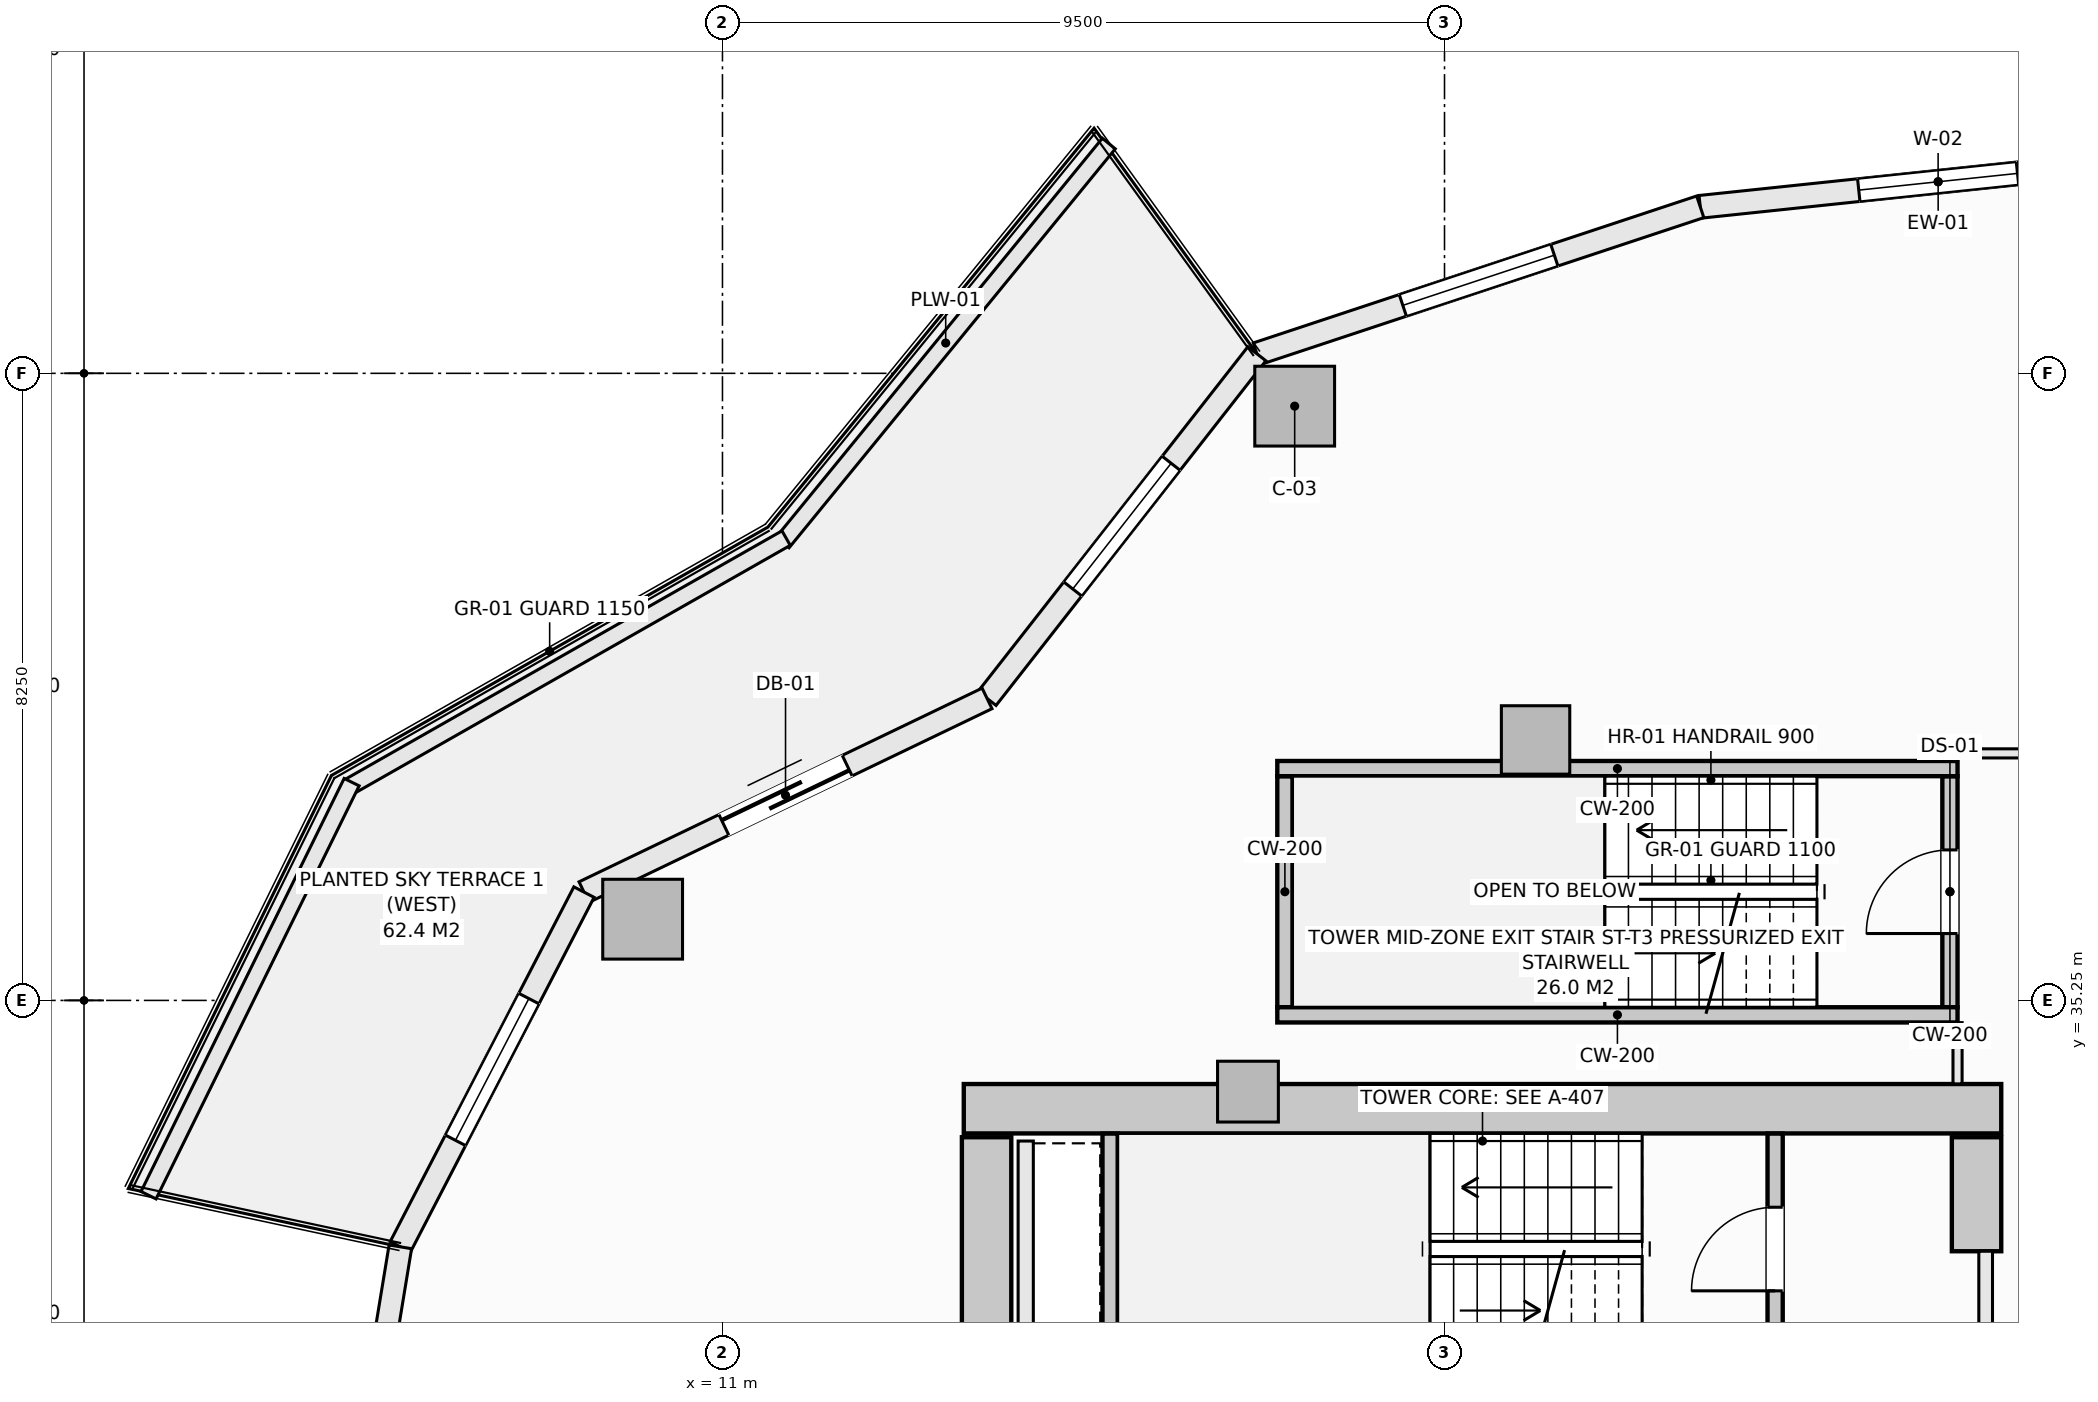
"""IFC4 building model, lengths in metres.
Left out: names, types, materials, properties, quantities, classifications, styles, units other than length and angle.
Written with IfcOpenShell. Run it as: python <this file> out.ifc"""

import sys

from ifc_helpers import new_model, si_unit, direction, frame, frame_2d, origin, origin_2d, place, context, subcontext, project, spatial, rectangle, extrude, element, fill, save


model = new_model("IFC4")
c1 = context("Model", 3, precision=1e-05, world=origin(), true_north=direction((0.0, 1.0)))
c2 = subcontext(c1, "Body", "Model", "MODEL_VIEW")
j1 = project(units=[si_unit("LENGTHUNIT", "METRE"), si_unit("PLANEANGLEUNIT", "RADIAN")], contexts=[c1])
p1 = place(None, origin())
s1 = spatial("IfcSite", under=j1, at=p1, CompositionType="ELEMENT")
p2 = place(p1, origin())
s2 = spatial("IfcBuilding", under=s1, at=p2, CompositionType="ELEMENT")
p3 = place(p2, frame((0.0, 0.0, 132.5)))
s3 = spatial("IfcBuildingStorey", under=s2, at=p3, CompositionType="ELEMENT", Elevation=132.5)
p4 = place(p3, frame((14.175, 33.825, -0.27), z_axis=(0.0, 0.0, 1.0), x_axis=(1.0, 0.0, 0.0)))
e1 = element("IfcWall", 1, at=p4, inside=s3, PredefinedType="SHEAR", context=c2, shape_type="SweptSolid", body=[
    extrude(rectangle(XDim=13.65, YDim=0.65, at=frame_2d((6.825, 0.0))), origin(), (0.0, 0.0, 1.0), 3.4),
])
p5 = place(p3, frame((14.475, 20.55, -0.27), z_axis=(0.0, 0.0, 1.0), x_axis=(0.0, 1.0, 0.0)))
e2 = element("IfcWall", 2, at=p5, inside=s3, PredefinedType="SHEAR", context=c2, shape_type="SweptSolid", body=[
    extrude(rectangle(XDim=12.9, YDim=0.65, at=frame_2d((6.45, 0.0))), origin(), (0.0, 0.0, 1.0), 3.4),
])
p6 = place(p3, frame((27.5, 31.95, -0.27), z_axis=(0.0, 0.0, 1.0), x_axis=(0.0, 1.0, 0.0)))
e3 = element("IfcWall", 3, at=p6, inside=s3, PredefinedType="SHEAR", context=c2, shape_type="SweptSolid", body=[
    extrude(rectangle(XDim=1.5, YDim=0.65, at=frame_2d((0.75, 0.0))), origin(), (0.0, 0.0, 1.0), 3.4),
])
for number, where, z_axis, x_axis in (
    (4, (18.529, 43.068, -0.27), (0.0, 0.0, 1.0), (1.0, 0.0, 0.0)),
    (5, (9.95, 36.319, -0.27), (0.0, 0.0, 1.0), (1.0, 0.0, 0.0)),
):
    element("IfcColumn", number, at=place(p3, frame(where, z_axis=z_axis, x_axis=x_axis)), inside=s3, PredefinedType="COLUMN", context=c2, shape_type="SweptSolid", body=[
        extrude(rectangle(XDim=1.05, YDim=1.05, at=origin_2d()), origin(), (0.0, 0.0, 1.0), 3.4),
    ])
p7 = place(p3, frame((21.698, 38.677, -0.27), z_axis=(0.0, 0.0, 1.0), x_axis=(1.0, 0.0, 0.0)))
e6 = element("IfcColumn", 6, at=p7, inside=s3, PredefinedType="COLUMN", context=c2, shape_type="SweptSolid", body=[
    extrude(rectangle(XDim=0.9, YDim=0.9, at=origin_2d()), origin(), (0.0, 0.0, 1.0), 3.4),
])
p8 = place(p3, frame((17.914, 34.05, -0.27), z_axis=(0.0, 0.0, 1.0), x_axis=(1.0, 0.0, 0.0)))
e7 = element("IfcColumn", 7, at=p8, inside=s3, PredefinedType="PILASTER", context=c2, shape_type="SweptSolid", body=[
    extrude(rectangle(XDim=0.8, YDim=0.8, at=origin_2d()), origin(), (0.0, 0.0, 1.0), 3.4),
])
p9 = place(p3, frame((23.865, 45.691, 0.0), z_axis=(0.0, 0.0, 1.0), x_axis=(0.994498012394, 0.104755445421, 0.0)))
e8 = element("IfcWall", 8, at=p9, inside=s3, PredefinedType="SOLIDWALL", context=c2, shape_type="SweptSolid", body=[
    extrude(rectangle(XDim=6.295, YDim=0.3, at=frame_2d((3.147, 0.0))), origin(), (0.0, 0.0, 1.0), 2.653),
])
p10 = place(p9, frame((2.097, 0.0, 0.74)))
e9 = element("IfcOpeningElement", 9, at=p10, cuts=e8, PredefinedType="OPENING", context=c2, shape_type="SweptSolid", body=[
    extrude(rectangle(XDim=2.1, YDim=1.7, at=frame_2d((1.05, 0.85))), frame((0.0, 0.16, 0.0), z_axis=(0.0, -1.0, 0.0), x_axis=(1.0, 0.0, 0.0)), (0.0, 0.0, 1.0), 0.32),
])
p11 = place(p3, frame((18.031, 43.758, 0.0), z_axis=(0.0, 0.0, 1.0), x_axis=(0.949238009374, 0.314558741032, 0.0)))
e10 = element("IfcWall", 10, at=p11, inside=s3, PredefinedType="SOLIDWALL", context=c2, shape_type="SweptSolid", body=[
    extrude(rectangle(XDim=6.146, YDim=0.3, at=frame_2d((3.073, 0.0))), origin(), (0.0, 0.0, 1.0), 2.653),
])
p12 = place(p11, frame((2.023, 0.0, 0.74)))
e11 = element("IfcOpeningElement", 11, at=p12, cuts=e10, PredefinedType="OPENING", context=c2, shape_type="SweptSolid", body=[
    extrude(rectangle(XDim=2.1, YDim=1.7, at=frame_2d((1.05, 0.85))), frame((0.0, 0.16, 0.0), z_axis=(0.0, -1.0, 0.0), x_axis=(1.0, 0.0, 0.0)), (0.0, 0.0, 1.0), 0.32),
])
p13 = place(p3, frame((14.481, 39.223, 0.0), z_axis=(0.0, 0.0, 1.0), x_axis=(0.616435134162, 0.787405693001, 0.0)))
e12 = element("IfcWall", 12, at=p13, inside=s3, PredefinedType="SOLIDWALL", context=c2, shape_type="SweptSolid", body=[
    extrude(rectangle(XDim=5.759, YDim=0.3, at=frame_2d((2.879, 0.0))), origin(), (0.0, 0.0, 1.0), 2.653),
])
p14 = place(p13, frame((1.829, 0.0, 0.74)))
e13 = element("IfcOpeningElement", 13, at=p14, cuts=e12, PredefinedType="OPENING", context=c2, shape_type="SweptSolid", body=[
    extrude(rectangle(XDim=2.1, YDim=1.7, at=frame_2d((1.05, 0.85))), frame((0.0, 0.16, 0.0), z_axis=(0.0, -1.0, 0.0), x_axis=(1.0, 0.0, 0.0)), (0.0, 0.0, 1.0), 0.32),
])
p15 = place(p3, frame((9.178, 36.675, 0.0), z_axis=(0.0, 0.0, 1.0), x_axis=(0.901370184739, 0.433049408339, 0.0)))
e14 = element("IfcWall", 14, at=p15, inside=s3, PredefinedType="SOLIDWALL", context=c2, shape_type="SweptSolid", body=[
    extrude(rectangle(XDim=5.884, YDim=0.3, at=frame_2d((2.942, 0.0))), origin(), (0.0, 0.0, 1.0), 2.653),
])
p16 = place(p15, frame((2.042, 0.0, 0.0)))
e15 = element("IfcOpeningElement", 15, at=p16, cuts=e14, PredefinedType="OPENING", context=c2, shape_type="SweptSolid", body=[
    extrude(rectangle(XDim=1.8, YDim=2.25, at=frame_2d((0.9, 1.125))), frame((0.0, 0.16, 0.0), z_axis=(0.0, -1.0, 0.0), x_axis=(1.0, 0.0, 0.0)), (0.0, 0.0, 1.0), 0.32),
])
p17 = place(p3, frame((6.762, 32.008, 0.0), z_axis=(0.0, 0.0, 1.0), x_axis=(0.459767899643, 0.888039119892, 0.0)))
e16 = element("IfcWall", 16, at=p17, inside=s3, PredefinedType="SOLIDWALL", context=c2, shape_type="SweptSolid", body=[
    extrude(rectangle(XDim=5.255, YDim=0.3, at=frame_2d((2.628, 0.0))), origin(), (0.0, 0.0, 1.0), 2.653),
])
p18 = place(p17, frame((1.578, 0.0, 0.74)))
e17 = element("IfcOpeningElement", 17, at=p18, cuts=e16, PredefinedType="OPENING", context=c2, shape_type="SweptSolid", body=[
    extrude(rectangle(XDim=2.1, YDim=1.7, at=frame_2d((1.05, 0.85))), frame((0.0, 0.16, 0.0), z_axis=(0.0, -1.0, 0.0), x_axis=(1.0, 0.0, 0.0)), (0.0, 0.0, 1.0), 0.32),
])
p19 = place(p3, frame((5.938, 27.0, 0.0), z_axis=(0.0, 0.0, 1.0), x_axis=(0.162393944769, 0.986726003864, 0.0)))
e18 = element("IfcWall", 18, at=p19, inside=s3, PredefinedType="SOLIDWALL", context=c2, shape_type="SweptSolid", body=[
    extrude(rectangle(XDim=5.075, YDim=0.3, at=frame_2d((2.538, 0.0))), origin(), (0.0, 0.0, 1.0), 2.653),
])
p20 = place(p19, frame((1.85, 0.0, 0.74)))
e19 = element("IfcOpeningElement", 19, at=p20, cuts=e18, PredefinedType="OPENING", context=c2, shape_type="SweptSolid", body=[
    extrude(rectangle(XDim=2.1, YDim=1.7, at=frame_2d((1.05, 0.85))), frame((0.0, 0.16, 0.0), z_axis=(0.0, -1.0, 0.0), x_axis=(1.0, 0.0, 0.0)), (0.0, 0.0, 1.0), 0.32),
])
p21 = place(p3, frame((11.791, 41.274, 0.0), z_axis=(0.0, 0.0, 1.0), x_axis=(0.633024046468, 0.774132131224, 0.0)))
e20 = element("IfcWall", 20, at=p21, inside=s3, PredefinedType="PARAPET", context=c2, shape_type="SweptSolid", body=[
    extrude(rectangle(XDim=6.781, YDim=0.22, at=frame_2d((3.39, 0.0))), origin(), (0.0, 0.0, 1.0), 0.52),
])
p22 = place(p3, frame((6.095, 38.066, 0.0), z_axis=(0.0, 0.0, 1.0), x_axis=(0.869187658335, 0.494482370361, 0.0)))
e21 = element("IfcWall", 21, at=p22, inside=s3, PredefinedType="PARAPET", context=c2, shape_type="SweptSolid", body=[
    extrude(rectangle(XDim=6.606, YDim=0.22, at=frame_2d((3.303, 0.0))), origin(), (0.0, 0.0, 1.0), 0.52),
])
p23 = place(p3, frame((3.449, 32.687, 0.0), z_axis=(0.0, 0.0, 1.0), x_axis=(0.441269631716, 0.897374566235, 0.0)))
e22 = element("IfcWall", 22, at=p23, inside=s3, PredefinedType="PARAPET", context=c2, shape_type="SweptSolid", body=[
    extrude(rectangle(XDim=6.056, YDim=0.22, at=frame_2d((3.028, 0.0))), origin(), (0.0, 0.0, 1.0), 0.52),
])
p24 = place(p3, frame((24.85, 30.46, -0.27), z_axis=(0.0, 0.0, 1.0), x_axis=(0.0, 1.0, 0.0)))
e23 = element("IfcWall", 23, at=p24, inside=s3, PredefinedType="SHEAR", context=c2, shape_type="SweptSolid", body=[
    extrude(rectangle(XDim=3.038, YDim=0.2, at=frame_2d((1.519, 0.0))), origin(), (0.0, 0.0, 1.0), 3.4),
])
p25 = place(p24, frame((0.969, 0.0, 0.27)))
e24 = element("IfcOpeningElement", 24, at=p25, cuts=e23, PredefinedType="OPENING", context=c2, shape_type="SweptSolid", body=[
    extrude(rectangle(XDim=1.1, YDim=2.15, at=frame_2d((0.55, 1.075))), frame((0.0, 0.11, 0.0), z_axis=(0.0, -1.0, 0.0), x_axis=(1.0, 0.0, 0.0)), (0.0, 0.0, 1.0), 0.22),
])
p26 = place(p3, frame((16.1, 30.462, -0.27), z_axis=(0.0, 0.0, 1.0), x_axis=(0.0, 1.0, 0.0)))
e25 = element("IfcWall", 25, at=p26, inside=s3, PredefinedType="SHEAR", context=c2, shape_type="SweptSolid", body=[
    extrude(rectangle(XDim=3.036, YDim=0.2, at=frame_2d((1.518, 0.0))), origin(), (0.0, 0.0, 1.0), 3.4),
])
p27 = place(p3, frame((27.15, 35.16, -0.27), z_axis=(0.0, 0.0, 1.0), x_axis=(0.0, 1.0, 0.0)))
e26 = element("IfcWall", 26, at=p27, inside=s3, PredefinedType="SHEAR", context=c2, shape_type="SweptSolid", body=[
    extrude(rectangle(XDim=3.04, YDim=0.2, at=frame_2d((1.52, 0.0))), origin(), (0.0, 0.0, 1.0), 3.4),
])
p28 = place(p27, frame((0.97, 0.0, 0.27)))
e27 = element("IfcOpeningElement", 27, at=p28, cuts=e26, PredefinedType="OPENING", context=c2, shape_type="SweptSolid", body=[
    extrude(rectangle(XDim=1.1, YDim=2.15, at=frame_2d((0.55, 1.075))), frame((0.0, 0.11, 0.0), z_axis=(0.0, -1.0, 0.0), x_axis=(1.0, 0.0, 0.0)), (0.0, 0.0, 1.0), 0.22),
])
p29 = place(p3, frame((18.4, 35.16, -0.27), z_axis=(0.0, 0.0, 1.0), x_axis=(0.0, 1.0, 0.0)))
e28 = element("IfcWall", 28, at=p29, inside=s3, PredefinedType="SHEAR", context=c2, shape_type="SweptSolid", body=[
    extrude(rectangle(XDim=3.04, YDim=0.2, at=frame_2d((1.52, 0.0))), origin(), (0.0, 0.0, 1.0), 3.4),
])
for number, where, z_axis, x_axis in (
    (29, (18.3, 38.3, -0.27), (0.0, 0.0, 1.0), (1.0, 0.0, 0.0)),
    (30, (18.3, 35.06, -0.27), (0.0, 0.0, 1.0), (1.0, 0.0, 0.0)),
):
    element("IfcWall", number, at=place(p3, frame(where, z_axis=z_axis, x_axis=x_axis)), inside=s3, PredefinedType="SHEAR", context=c2, shape_type="SweptSolid", body=[
        extrude(rectangle(XDim=8.95, YDim=0.2, at=frame_2d((4.475, 0.0))), origin(), (0.0, 0.0, 1.0), 3.4),
    ])
p30 = place(p3, frame((14.99, 30.55, 0.0), z_axis=(0.0, 0.0, 1.0), x_axis=(0.0, 1.0, 0.0)))
e31 = element("IfcWall", 31, at=p30, inside=s3, PredefinedType="SOLIDWALL", context=c2, shape_type="SweptSolid", body=[
    extrude(rectangle(XDim=2.85, YDim=0.2, at=frame_2d((1.425, 0.0))), origin(), (0.0, 0.0, 1.0), 3.13),
])
p31 = place(p3, frame((27.62, 22.05, 0.0), z_axis=(0.0, 0.0, 1.0), x_axis=(0.0, 1.0, 0.0)))
e32 = element("IfcWall", 32, at=p31, inside=s3, PredefinedType="SOLIDWALL", context=c2, shape_type="SweptSolid", body=[
    extrude(rectangle(XDim=9.9, YDim=0.18, at=frame_2d((4.95, 0.0))), origin(), (0.0, 0.0, 1.0), 3.13),
])
p32 = place(p31, frame((4.475, 0.0, 0.0)))
e33 = element("IfcOpeningElement", 33, at=p32, cuts=e32, PredefinedType="OPENING", context=c2, shape_type="SweptSolid", body=[
    extrude(rectangle(XDim=0.95, YDim=2.1, at=frame_2d((0.475, 1.05))), frame((0.0, 0.1, 0.0), z_axis=(0.0, -1.0, 0.0), x_axis=(1.0, 0.0, 0.0)), (0.0, 0.0, 1.0), 0.2),
])
p33 = place(p31, frame((6.89, 0.0, 0.0)))
e34 = element("IfcOpeningElement", 34, at=p33, cuts=e32, PredefinedType="OPENING", context=c2, shape_type="SweptSolid", body=[
    extrude(rectangle(XDim=1.5, YDim=2.2, at=frame_2d((0.75, 1.1))), frame((0.0, 0.1, 0.0), z_axis=(0.0, -1.0, 0.0), x_axis=(1.0, 0.0, 0.0)), (0.0, 0.0, 1.0), 0.2),
])
p34 = place(p31, frame((1.51, 0.0, 0.0)))
e35 = element("IfcOpeningElement", 35, at=p34, cuts=e32, PredefinedType="OPENING", context=c2, shape_type="SweptSolid", body=[
    extrude(rectangle(XDim=1.5, YDim=2.2, at=frame_2d((0.75, 1.1))), frame((0.0, 0.1, 0.0), z_axis=(0.0, -1.0, 0.0), x_axis=(1.0, 0.0, 0.0)), (0.0, 0.0, 1.0), 0.2),
])
p35 = place(p3, frame((27.25, 34.152, 0.0), z_axis=(0.0, 0.0, 1.0), x_axis=(0.0, 1.0, 0.0)))
e36 = element("IfcWall", 36, at=p35, inside=s3, PredefinedType="PARTITIONING", context=c2, shape_type="SweptSolid", body=[
    extrude(rectangle(XDim=0.806, YDim=0.12, at=frame_2d((0.403, 0.0))), origin(), (0.0, 0.0, 1.0), 3.13),
])
p36 = place(p3, frame((27.25, 38.5, 0.0), z_axis=(0.0, 0.0, 1.0), x_axis=(1.0, 0.0, 0.0)))
e37 = element("IfcWall", 37, at=p36, inside=s3, PredefinedType="PARTITIONING", context=c2, shape_type="SweptSolid", body=[
    extrude(rectangle(XDim=2.53, YDim=0.12, at=frame_2d((1.265, 0.0))), origin(), (0.0, 0.0, 1.0), 3.13),
])
p37 = place(p10, origin())
e38 = element("IfcWindow", 38, at=p37, inside=s3, PartitioningType="SINGLE_PANEL", PredefinedType="WINDOW", context=c2, shape_type="SweptSolid", body=[
    extrude(rectangle(XDim=2.1, YDim=1.7, at=frame_2d((1.05, 0.85))), frame((0.0, 0.03, 0.0), z_axis=(0.0, -1.0, 0.0), x_axis=(1.0, 0.0, 0.0)), (0.0, 0.0, 1.0), 0.06),
])
fill(e9, e38)
p38 = place(p12, origin())
e39 = element("IfcWindow", 39, at=p38, inside=s3, PartitioningType="SINGLE_PANEL", PredefinedType="WINDOW", context=c2, shape_type="SweptSolid", body=[
    extrude(rectangle(XDim=2.1, YDim=1.7, at=frame_2d((1.05, 0.85))), frame((0.0, 0.03, 0.0), z_axis=(0.0, -1.0, 0.0), x_axis=(1.0, 0.0, 0.0)), (0.0, 0.0, 1.0), 0.06),
])
fill(e11, e39)
p39 = place(p14, origin())
e40 = element("IfcWindow", 40, at=p39, inside=s3, PartitioningType="SINGLE_PANEL", PredefinedType="WINDOW", context=c2, shape_type="SweptSolid", body=[
    extrude(rectangle(XDim=2.1, YDim=1.7, at=frame_2d((1.05, 0.85))), frame((0.0, 0.03, 0.0), z_axis=(0.0, -1.0, 0.0), x_axis=(1.0, 0.0, 0.0)), (0.0, 0.0, 1.0), 0.06),
])
fill(e13, e40)
p40 = place(p16, origin())
e41 = element("IfcDoor", 41, at=p40, inside=s3, OperationType="SLIDING_TO_LEFT", PredefinedType="DOOR", context=c2, shape_type="SweptSolid", body=[
    extrude(rectangle(XDim=1.8, YDim=2.25, at=frame_2d((0.9, 1.125))), frame((0.0, 0.025, 0.0), z_axis=(0.0, -1.0, 0.0), x_axis=(1.0, 0.0, 0.0)), (0.0, 0.0, 1.0), 0.05),
])
fill(e15, e41)
p41 = place(p18, origin())
e42 = element("IfcWindow", 42, at=p41, inside=s3, PartitioningType="SINGLE_PANEL", PredefinedType="WINDOW", context=c2, shape_type="SweptSolid", body=[
    extrude(rectangle(XDim=2.1, YDim=1.7, at=frame_2d((1.05, 0.85))), frame((0.0, 0.03, 0.0), z_axis=(0.0, -1.0, 0.0), x_axis=(1.0, 0.0, 0.0)), (0.0, 0.0, 1.0), 0.06),
])
fill(e17, e42)
p42 = place(p25, origin())
e43 = element("IfcDoor", 43, at=p42, inside=s3, OperationType="SINGLE_SWING_LEFT", PredefinedType="DOOR", context=c2, shape_type="SweptSolid", body=[
    extrude(rectangle(XDim=1.1, YDim=2.15, at=frame_2d((0.55, 1.075))), frame((0.0, 0.025, 0.0), z_axis=(0.0, -1.0, 0.0), x_axis=(1.0, 0.0, 0.0)), (0.0, 0.0, 1.0), 0.05),
])
fill(e24, e43)
p43 = place(p28, origin())
e44 = element("IfcDoor", 44, at=p43, inside=s3, OperationType="SINGLE_SWING_LEFT", PredefinedType="DOOR", context=c2, shape_type="SweptSolid", body=[
    extrude(rectangle(XDim=1.1, YDim=2.15, at=frame_2d((0.55, 1.075))), frame((0.0, 0.025, 0.0), z_axis=(0.0, -1.0, 0.0), x_axis=(1.0, 0.0, 0.0)), (0.0, 0.0, 1.0), 0.05),
])
fill(e27, e44)
save(model, sys.argv[1])
